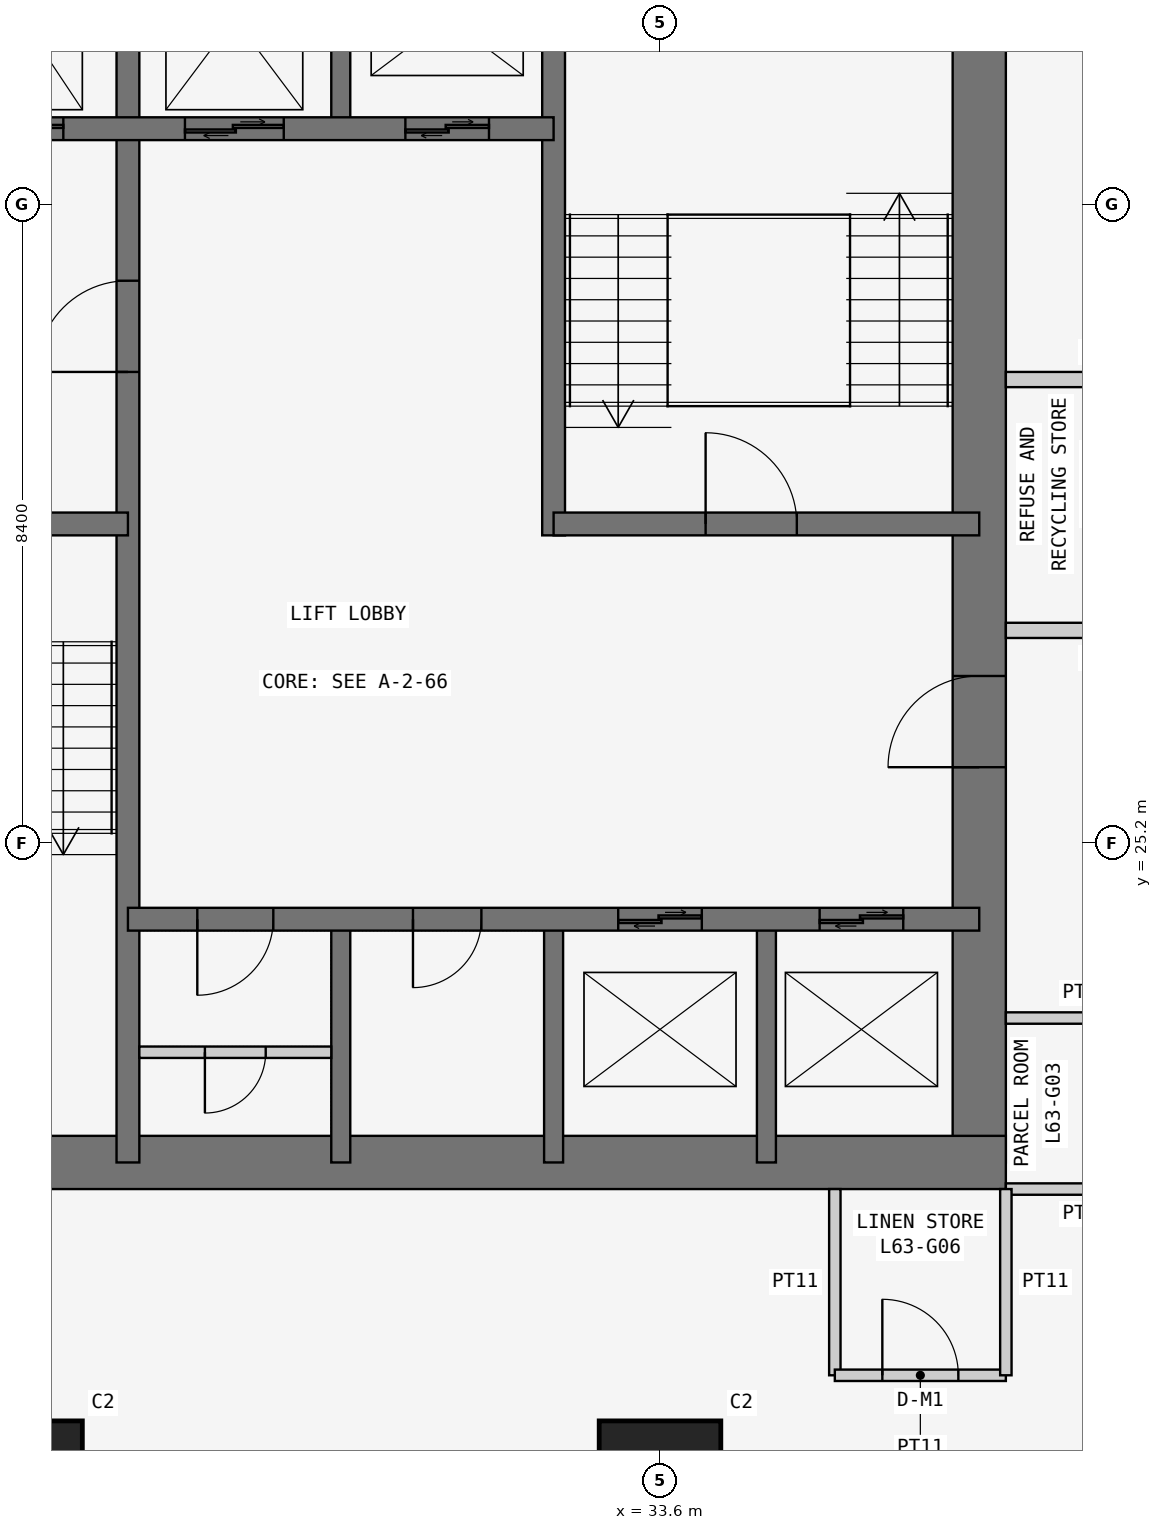
"""IFC4 building model, lengths in metres.
Left out: names, types, materials, properties, quantities, classifications, styles, units other than length and angle.
Written with IfcOpenShell. Run it as: python <this file> out.ifc"""

import sys

from ifc_helpers import new_model, si_unit, direction, frame, frame_2d, origin, origin_2d, place, context, subcontext, project, spatial, rectangle, extrude, element, fill, save


model = new_model("IFC4")
c1 = context("Model", 3, precision=1e-05, world=origin(), true_north=direction((0.0, 1.0)))
c2 = subcontext(c1, "Body", "Model", "MODEL_VIEW")
j1 = project(units=[si_unit("LENGTHUNIT", "METRE"), si_unit("PLANEANGLEUNIT", "RADIAN")], contexts=[c1])
p1 = place(None, origin())
s1 = spatial("IfcSite", under=j1, at=p1, CompositionType="ELEMENT")
p2 = place(p1, origin())
s2 = spatial("IfcBuilding", under=s1, at=p2, CompositionType="ELEMENT")
p3 = place(p2, frame((0.0, 0.0, 240.9)))
s3 = spatial("IfcBuildingStorey", under=s2, at=p3, CompositionType="ELEMENT", Elevation=240.9)
for number, where, z_axis, x_axis in (
    (1, (25.2, 16.8, 0.0), (0.0, 0.0, 1.0), (1.0, 0.0, 0.0)),
    (2, (33.6, 16.8, 0.0), (0.0, 0.0, 1.0), (1.0, 0.0, 0.0)),
):
    element("IfcColumn", number, at=place(p3, frame(where, z_axis=z_axis, x_axis=x_axis)), inside=s3, PredefinedType="COLUMN", context=c2, shape_type="SweptSolid", body=[
        extrude(rectangle(XDim=1.6, YDim=1.6, at=origin_2d()), origin(), (0.0, 0.0, 1.0), 3.6),
    ])
p4 = place(p3, frame((21.0, 21.0, 0.0), z_axis=(0.0, 0.0, 1.0), x_axis=(1.0, 0.0, 0.0)))
e3 = element("IfcWall", 3, at=p4, inside=s3, PredefinedType="SHEAR", context=c2, shape_type="SweptSolid", body=[
    extrude(rectangle(XDim=17.15, YDim=0.7, at=frame_2d((8.575, 0.0))), origin(), (0.0, 0.0, 1.0), 3.6),
])
p5 = place(p3, frame((37.8, 21.0, 0.0), z_axis=(0.0, 0.0, 1.0), x_axis=(0.0, 1.0, 0.0)))
e4 = element("IfcWall", 4, at=p5, inside=s3, PredefinedType="SHEAR", context=c2, shape_type="SweptSolid", body=[
    extrude(rectangle(XDim=17.15, YDim=0.7, at=frame_2d((8.575, 0.0))), origin(), (0.0, 0.0, 1.0), 3.6),
])
p6 = place(p5, frame((5.2, 0.0, 0.0)))
e5 = element("IfcOpeningElement", 5, at=p6, cuts=e4, PredefinedType="OPENING", context=c2, shape_type="SweptSolid", body=[
    extrude(rectangle(XDim=1.2, YDim=2.1, at=frame_2d((0.6, 1.05))), frame((0.0, 0.36, 0.0), z_axis=(0.0, -1.0, 0.0), x_axis=(1.0, 0.0, 0.0)), (0.0, 0.0, 1.0), 0.72),
])
p7 = place(p3, frame((26.6, 21.0, 0.0), z_axis=(0.0, 0.0, 1.0), x_axis=(0.0, 1.0, 0.0)))
e6 = element("IfcWall", 6, at=p7, inside=s3, PredefinedType="SHEAR", context=c2, shape_type="SweptSolid", body=[
    extrude(rectangle(XDim=16.8, YDim=0.3, at=frame_2d((8.4, 0.0))), origin(), (0.0, 0.0, 1.0), 3.6),
])
p8 = place(p7, frame((10.4, 0.0, 0.0)))
e7 = element("IfcOpeningElement", 7, at=p8, cuts=e6, PredefinedType="OPENING", context=c2, shape_type="SweptSolid", body=[
    extrude(rectangle(XDim=1.2, YDim=2.1, at=frame_2d((0.6, 1.05))), frame((0.0, 0.16, 0.0), z_axis=(0.0, -1.0, 0.0), x_axis=(1.0, 0.0, 0.0)), (0.0, 0.0, 1.0), 0.32),
])
p9 = place(p3, frame((21.0, 29.4, 0.0), z_axis=(0.0, 0.0, 1.0), x_axis=(1.0, 0.0, 0.0)))
e8 = element("IfcWall", 8, at=p9, inside=s3, PredefinedType="SHEAR", context=c2, shape_type="SweptSolid", body=[
    extrude(rectangle(XDim=5.6, YDim=0.3, at=frame_2d((2.8, 0.0))), origin(), (0.0, 0.0, 1.0), 3.6),
])
p10 = place(p9, frame((2.3, 0.0, 0.0)))
e9 = element("IfcOpeningElement", 9, at=p10, cuts=e8, PredefinedType="OPENING", context=c2, shape_type="SweptSolid", body=[
    extrude(rectangle(XDim=1.2, YDim=2.1, at=frame_2d((0.6, 1.05))), frame((0.0, 0.16, 0.0), z_axis=(0.0, -1.0, 0.0), x_axis=(1.0, 0.0, 0.0)), (0.0, 0.0, 1.0), 0.32),
])
p11 = place(p3, frame((21.0, 34.6, 0.0), z_axis=(0.0, 0.0, 1.0), x_axis=(1.0, 0.0, 0.0)))
e10 = element("IfcWall", 10, at=p11, inside=s3, PredefinedType="SHEAR", context=c2, shape_type="SweptSolid", body=[
    extrude(rectangle(XDim=11.2, YDim=0.3, at=frame_2d((5.6, 0.0))), origin(), (0.0, 0.0, 1.0), 3.6),
])
p12 = place(p11, frame((9.25, 0.0, 0.0)))
e11 = element("IfcOpeningElement", 11, at=p12, cuts=e10, PredefinedType="OPENING", context=c2, shape_type="SweptSolid", body=[
    extrude(rectangle(XDim=1.1, YDim=2.1, at=frame_2d((0.55, 1.05))), frame((0.0, 0.16, 0.0), z_axis=(0.0, -1.0, 0.0), x_axis=(1.0, 0.0, 0.0)), (0.0, 0.0, 1.0), 0.32),
])
p13 = place(p11, frame((1.0, 0.0, 0.0)))
e12 = element("IfcOpeningElement", 12, at=p13, cuts=e10, PredefinedType="OPENING", context=c2, shape_type="SweptSolid", body=[
    extrude(rectangle(XDim=1.1, YDim=2.1, at=frame_2d((0.55, 1.05))), frame((0.0, 0.16, 0.0), z_axis=(0.0, -1.0, 0.0), x_axis=(1.0, 0.0, 0.0)), (0.0, 0.0, 1.0), 0.32),
])
p14 = place(p11, frame((3.65, 0.0, 0.0)))
e13 = element("IfcOpeningElement", 13, at=p14, cuts=e10, PredefinedType="OPENING", context=c2, shape_type="SweptSolid", body=[
    extrude(rectangle(XDim=1.1, YDim=2.1, at=frame_2d((0.55, 1.05))), frame((0.0, 0.16, 0.0), z_axis=(0.0, -1.0, 0.0), x_axis=(1.0, 0.0, 0.0)), (0.0, 0.0, 1.0), 0.32),
])
p15 = place(p11, frame((6.35, 0.0, 0.0)))
e14 = element("IfcOpeningElement", 14, at=p15, cuts=e10, PredefinedType="OPENING", context=c2, shape_type="SweptSolid", body=[
    extrude(rectangle(XDim=1.3, YDim=2.1, at=frame_2d((0.65, 1.05))), frame((0.0, 0.16, 0.0), z_axis=(0.0, -1.0, 0.0), x_axis=(1.0, 0.0, 0.0)), (0.0, 0.0, 1.0), 0.32),
])
p16 = place(p3, frame((26.6, 24.2, 0.0), z_axis=(0.0, 0.0, 1.0), x_axis=(1.0, 0.0, 0.0)))
e15 = element("IfcWall", 15, at=p16, inside=s3, PredefinedType="SHEAR", context=c2, shape_type="SweptSolid", body=[
    extrude(rectangle(XDim=11.2, YDim=0.3, at=frame_2d((5.6, 0.0))), origin(), (0.0, 0.0, 1.0), 3.6),
])
p17 = place(p16, frame((0.913, 0.0, 0.0)))
e16 = element("IfcOpeningElement", 16, at=p17, cuts=e15, PredefinedType="OPENING", context=c2, shape_type="SweptSolid", body=[
    extrude(rectangle(XDim=1.0, YDim=2.1, at=frame_2d((0.5, 1.05))), frame((0.0, 0.16, 0.0), z_axis=(0.0, -1.0, 0.0), x_axis=(1.0, 0.0, 0.0)), (0.0, 0.0, 1.0), 0.32),
])
p18 = place(p16, frame((3.75, 0.0, 0.0)))
e17 = element("IfcOpeningElement", 17, at=p18, cuts=e15, PredefinedType="OPENING", context=c2, shape_type="SweptSolid", body=[
    extrude(rectangle(XDim=0.9, YDim=2.1, at=frame_2d((0.45, 1.05))), frame((0.0, 0.16, 0.0), z_axis=(0.0, -1.0, 0.0), x_axis=(1.0, 0.0, 0.0)), (0.0, 0.0, 1.0), 0.32),
])
p19 = place(p16, frame((6.45, 0.0, 0.0)))
e18 = element("IfcOpeningElement", 18, at=p19, cuts=e15, PredefinedType="OPENING", context=c2, shape_type="SweptSolid", body=[
    extrude(rectangle(XDim=1.1, YDim=2.1, at=frame_2d((0.55, 1.05))), frame((0.0, 0.16, 0.0), z_axis=(0.0, -1.0, 0.0), x_axis=(1.0, 0.0, 0.0)), (0.0, 0.0, 1.0), 0.32),
])
p20 = place(p16, frame((9.1, 0.0, 0.0)))
e19 = element("IfcOpeningElement", 19, at=p20, cuts=e15, PredefinedType="OPENING", context=c2, shape_type="SweptSolid", body=[
    extrude(rectangle(XDim=1.1, YDim=2.1, at=frame_2d((0.55, 1.05))), frame((0.0, 0.16, 0.0), z_axis=(0.0, -1.0, 0.0), x_axis=(1.0, 0.0, 0.0)), (0.0, 0.0, 1.0), 0.32),
])
p21 = place(p3, frame((32.2, 29.25, 0.0), z_axis=(0.0, 0.0, 1.0), x_axis=(0.0, 1.0, 0.0)))
e20 = element("IfcWall", 20, at=p21, inside=s3, PredefinedType="SHEAR", context=c2, shape_type="SweptSolid", body=[
    extrude(rectangle(XDim=8.55, YDim=0.3, at=frame_2d((4.275, 0.0))), origin(), (0.0, 0.0, 1.0), 3.6),
])
p22 = place(p3, frame((32.2, 29.4, 0.0), z_axis=(0.0, 0.0, 1.0), x_axis=(1.0, 0.0, 0.0)))
e21 = element("IfcWall", 21, at=p22, inside=s3, PredefinedType="SHEAR", context=c2, shape_type="SweptSolid", body=[
    extrude(rectangle(XDim=5.6, YDim=0.3, at=frame_2d((2.8, 0.0))), origin(), (0.0, 0.0, 1.0), 3.6),
])
p23 = place(p22, frame((2.0, 0.0, 0.0)))
e22 = element("IfcOpeningElement", 22, at=p23, cuts=e21, PredefinedType="OPENING", context=c2, shape_type="SweptSolid", body=[
    extrude(rectangle(XDim=1.2, YDim=2.1, at=frame_2d((0.6, 1.05))), frame((0.0, 0.16, 0.0), z_axis=(0.0, -1.0, 0.0), x_axis=(1.0, 0.0, 0.0)), (0.0, 0.0, 1.0), 0.32),
])
for number, where, z_axis, x_axis in (
    (23, (29.4, 21.0, 0.0), (0.0, 0.0, 1.0), (0.0, 1.0, 0.0)),
    (24, (32.2, 21.0, 0.0), (0.0, 0.0, 1.0), (0.0, 1.0, 0.0)),
    (25, (35.0, 21.0, 0.0), (0.0, 0.0, 1.0), (0.0, 1.0, 0.0)),
    (26, (29.4, 34.6, 0.0), (0.0, 0.0, 1.0), (0.0, 1.0, 0.0)),
):
    element("IfcWall", number, at=place(p3, frame(where, z_axis=z_axis, x_axis=x_axis)), inside=s3, PredefinedType="SHEAR", context=c2, shape_type="SweptSolid", body=[
        extrude(rectangle(XDim=3.2, YDim=0.25, at=frame_2d((1.6, 0.0))), origin(), (0.0, 0.0, 1.0), 3.6),
    ])
for number, where, z_axis, x_axis in (
    (27, (38.15, 20.65, 0.0), (0.0, 0.0, 1.0), (1.0, 0.0, 0.0)),
    (28, (40.25, 22.9, 0.0), (0.0, 0.0, 1.0), (-1.0, 0.0, 0.0)),
):
    element("IfcWall", number, at=place(p3, frame(where, z_axis=z_axis, x_axis=x_axis)), inside=s3, PredefinedType="PARTITIONING", context=c2, shape_type="SweptSolid", body=[
        extrude(rectangle(XDim=2.1, YDim=0.15, at=frame_2d((1.05, 0.0))), origin(), (0.0, 0.0, 1.0), 3.45),
    ])
for number, where, z_axis, x_axis in (
    (29, (38.15, 28.0, 0.0), (0.0, 0.0, 1.0), (1.0, 0.0, 0.0)),
    (30, (40.6, 31.3, 0.0), (0.0, 0.0, 1.0), (-1.0, 0.0, 0.0)),
):
    element("IfcWall", number, at=place(p3, frame(where, z_axis=z_axis, x_axis=x_axis)), inside=s3, PredefinedType="PARTITIONING", context=c2, shape_type="SweptSolid", body=[
        extrude(rectangle(XDim=2.45, YDim=0.2, at=frame_2d((1.225, 0.0))), origin(), (0.0, 0.0, 1.0), 3.45),
    ])
p24 = place(p3, frame((35.9, 20.65, 0.0), z_axis=(0.0, 0.0, 1.0), x_axis=(0.0, -1.0, 0.0)))
e31 = element("IfcWall", 31, at=p24, inside=s3, PredefinedType="PARTITIONING", context=c2, shape_type="SweptSolid", body=[
    extrude(rectangle(XDim=2.45, YDim=0.15, at=frame_2d((1.225, 0.0))), origin(), (0.0, 0.0, 1.0), 3.45),
])
p25 = place(p3, frame((35.9, 18.2, 0.0), z_axis=(0.0, 0.0, 1.0), x_axis=(1.0, 0.0, 0.0)))
e32 = element("IfcWall", 32, at=p25, inside=s3, PredefinedType="PARTITIONING", context=c2, shape_type="SweptSolid", body=[
    extrude(rectangle(XDim=2.25, YDim=0.15, at=frame_2d((1.125, 0.0))), origin(), (0.0, 0.0, 1.0), 3.45),
])
p26 = place(p25, frame((0.625, 0.0, 0.0)))
e33 = element("IfcOpeningElement", 33, at=p26, cuts=e32, PredefinedType="OPENING", context=c2, shape_type="SweptSolid", body=[
    extrude(rectangle(XDim=1.0, YDim=2.1, at=frame_2d((0.5, 1.05))), frame((0.0, 0.085, 0.0), z_axis=(0.0, -1.0, 0.0), x_axis=(1.0, 0.0, 0.0)), (0.0, 0.0, 1.0), 0.17),
])
p27 = place(p3, frame((38.15, 18.2, 0.0), z_axis=(0.0, 0.0, 1.0), x_axis=(0.0, 1.0, 0.0)))
e34 = element("IfcWall", 34, at=p27, inside=s3, PredefinedType="PARTITIONING", context=c2, shape_type="SweptSolid", body=[
    extrude(rectangle(XDim=2.45, YDim=0.15, at=frame_2d((1.225, 0.0))), origin(), (0.0, 0.0, 1.0), 3.45),
])
p28 = place(p3, frame((26.75, 22.45, 0.0), z_axis=(0.0, 0.0, 1.0), x_axis=(1.0, 0.0, 0.0)))
e35 = element("IfcWall", 35, at=p28, inside=s3, PredefinedType="PARTITIONING", context=c2, shape_type="SweptSolid", body=[
    extrude(rectangle(XDim=2.525, YDim=0.15, at=frame_2d((1.262, 0.0))), origin(), (0.0, 0.0, 1.0), 3.45),
])
p29 = place(p28, frame((0.863, 0.0, 0.0)))
e36 = element("IfcOpeningElement", 36, at=p29, cuts=e35, PredefinedType="OPENING", context=c2, shape_type="SweptSolid", body=[
    extrude(rectangle(XDim=0.8, YDim=2.1, at=frame_2d((0.4, 1.05))), frame((0.0, 0.085, 0.0), z_axis=(0.0, -1.0, 0.0), x_axis=(1.0, 0.0, 0.0)), (0.0, 0.0, 1.0), 0.17),
])
p30 = place(p26, origin())
e37 = element("IfcDoor", 37, at=p30, inside=s3, OperationType="SINGLE_SWING_LEFT", PredefinedType="DOOR", context=c2, shape_type="SweptSolid", body=[
    extrude(rectangle(XDim=1.0, YDim=2.1, at=frame_2d((0.5, 1.05))), frame((0.0, 0.025, 0.0), z_axis=(0.0, -1.0, 0.0), x_axis=(1.0, 0.0, 0.0)), (0.0, 0.0, 1.0), 0.05),
])
fill(e33, e37)
p31 = place(p8, origin())
e38 = element("IfcDoor", 38, at=p31, inside=s3, OperationType="SINGLE_SWING_LEFT", PredefinedType="DOOR", context=c2, shape_type="SweptSolid", body=[
    extrude(rectangle(XDim=1.2, YDim=2.1, at=frame_2d((0.6, 1.05))), frame((0.0, 0.025, 0.0), z_axis=(0.0, -1.0, 0.0), x_axis=(1.0, 0.0, 0.0)), (0.0, 0.0, 1.0), 0.05),
])
fill(e7, e38)
p32 = place(p6, origin())
e39 = element("IfcDoor", 39, at=p32, inside=s3, OperationType="SINGLE_SWING_LEFT", PredefinedType="DOOR", context=c2, shape_type="SweptSolid", body=[
    extrude(rectangle(XDim=1.2, YDim=2.1, at=frame_2d((0.6, 1.05))), frame((0.0, 0.025, 0.0), z_axis=(0.0, -1.0, 0.0), x_axis=(1.0, 0.0, 0.0)), (0.0, 0.0, 1.0), 0.05),
])
fill(e5, e39)
p33 = place(p23, origin())
e40 = element("IfcDoor", 40, at=p33, inside=s3, OperationType="SINGLE_SWING_LEFT", PredefinedType="DOOR", context=c2, shape_type="SweptSolid", body=[
    extrude(rectangle(XDim=1.2, YDim=2.1, at=frame_2d((0.6, 1.05))), frame((0.0, 0.025, 0.0), z_axis=(0.0, -1.0, 0.0), x_axis=(1.0, 0.0, 0.0)), (0.0, 0.0, 1.0), 0.05),
])
fill(e22, e40)
p34 = place(p17, frame((1.0, 0.0, 0.0), z_axis=(0.0, 0.0, 1.0), x_axis=(-1.0, 0.0, 0.0)))
e41 = element("IfcDoor", 41, at=p34, inside=s3, OperationType="SINGLE_SWING_RIGHT", PredefinedType="DOOR", context=c2, shape_type="SweptSolid", body=[
    extrude(rectangle(XDim=1.0, YDim=2.1, at=frame_2d((0.5, 1.05))), frame((0.0, 0.025, 0.0), z_axis=(0.0, -1.0, 0.0), x_axis=(1.0, 0.0, 0.0)), (0.0, 0.0, 1.0), 0.05),
])
fill(e16, e41)
p35 = place(p29, frame((0.8, 0.0, 0.0), z_axis=(0.0, 0.0, 1.0), x_axis=(-1.0, 0.0, 0.0)))
e42 = element("IfcDoor", 42, at=p35, inside=s3, OperationType="SINGLE_SWING_RIGHT", PredefinedType="DOOR", context=c2, shape_type="SweptSolid", body=[
    extrude(rectangle(XDim=0.8, YDim=2.1, at=frame_2d((0.4, 1.05))), frame((0.0, 0.025, 0.0), z_axis=(0.0, -1.0, 0.0), x_axis=(1.0, 0.0, 0.0)), (0.0, 0.0, 1.0), 0.05),
])
fill(e36, e42)
p36 = place(p18, frame((0.9, 0.0, 0.0), z_axis=(0.0, 0.0, 1.0), x_axis=(-1.0, 0.0, 0.0)))
e43 = element("IfcDoor", 43, at=p36, inside=s3, OperationType="SINGLE_SWING_RIGHT", PredefinedType="DOOR", context=c2, shape_type="SweptSolid", body=[
    extrude(rectangle(XDim=0.9, YDim=2.1, at=frame_2d((0.45, 1.05))), frame((0.0, 0.025, 0.0), z_axis=(0.0, -1.0, 0.0), x_axis=(1.0, 0.0, 0.0)), (0.0, 0.0, 1.0), 0.05),
])
fill(e17, e43)
p37 = place(p19, origin())
e44 = element("IfcDoor", 44, at=p37, inside=s3, OperationType="DOUBLE_DOOR_SLIDING", PredefinedType="DOOR", context=c2, shape_type="SweptSolid", body=[
    extrude(rectangle(XDim=1.1, YDim=2.1, at=frame_2d((0.55, 1.05))), frame((0.0, 0.025, 0.0), z_axis=(0.0, -1.0, 0.0), x_axis=(1.0, 0.0, 0.0)), (0.0, 0.0, 1.0), 0.05),
])
fill(e18, e44)
p38 = place(p20, origin())
e45 = element("IfcDoor", 45, at=p38, inside=s3, OperationType="DOUBLE_DOOR_SLIDING", PredefinedType="DOOR", context=c2, shape_type="SweptSolid", body=[
    extrude(rectangle(XDim=1.1, YDim=2.1, at=frame_2d((0.55, 1.05))), frame((0.0, 0.025, 0.0), z_axis=(0.0, -1.0, 0.0), x_axis=(1.0, 0.0, 0.0)), (0.0, 0.0, 1.0), 0.05),
])
fill(e19, e45)
p39 = place(p12, origin())
e46 = element("IfcDoor", 46, at=p39, inside=s3, OperationType="DOUBLE_DOOR_SLIDING", PredefinedType="DOOR", context=c2, shape_type="SweptSolid", body=[
    extrude(rectangle(XDim=1.1, YDim=2.1, at=frame_2d((0.55, 1.05))), frame((0.0, 0.025, 0.0), z_axis=(0.0, -1.0, 0.0), x_axis=(1.0, 0.0, 0.0)), (0.0, 0.0, 1.0), 0.05),
])
fill(e11, e46)
p40 = place(p14, origin())
e47 = element("IfcDoor", 47, at=p40, inside=s3, OperationType="DOUBLE_DOOR_SLIDING", PredefinedType="DOOR", context=c2, shape_type="SweptSolid", body=[
    extrude(rectangle(XDim=1.1, YDim=2.1, at=frame_2d((0.55, 1.05))), frame((0.0, 0.025, 0.0), z_axis=(0.0, -1.0, 0.0), x_axis=(1.0, 0.0, 0.0)), (0.0, 0.0, 1.0), 0.05),
])
fill(e13, e47)
p41 = place(p15, origin())
e48 = element("IfcDoor", 48, at=p41, inside=s3, OperationType="DOUBLE_DOOR_SLIDING", PredefinedType="DOOR", context=c2, shape_type="SweptSolid", body=[
    extrude(rectangle(XDim=1.3, YDim=2.1, at=frame_2d((0.65, 1.05))), frame((0.0, 0.025, 0.0), z_axis=(0.0, -1.0, 0.0), x_axis=(1.0, 0.0, 0.0)), (0.0, 0.0, 1.0), 0.05),
])
fill(e14, e48)
save(model, sys.argv[1])
